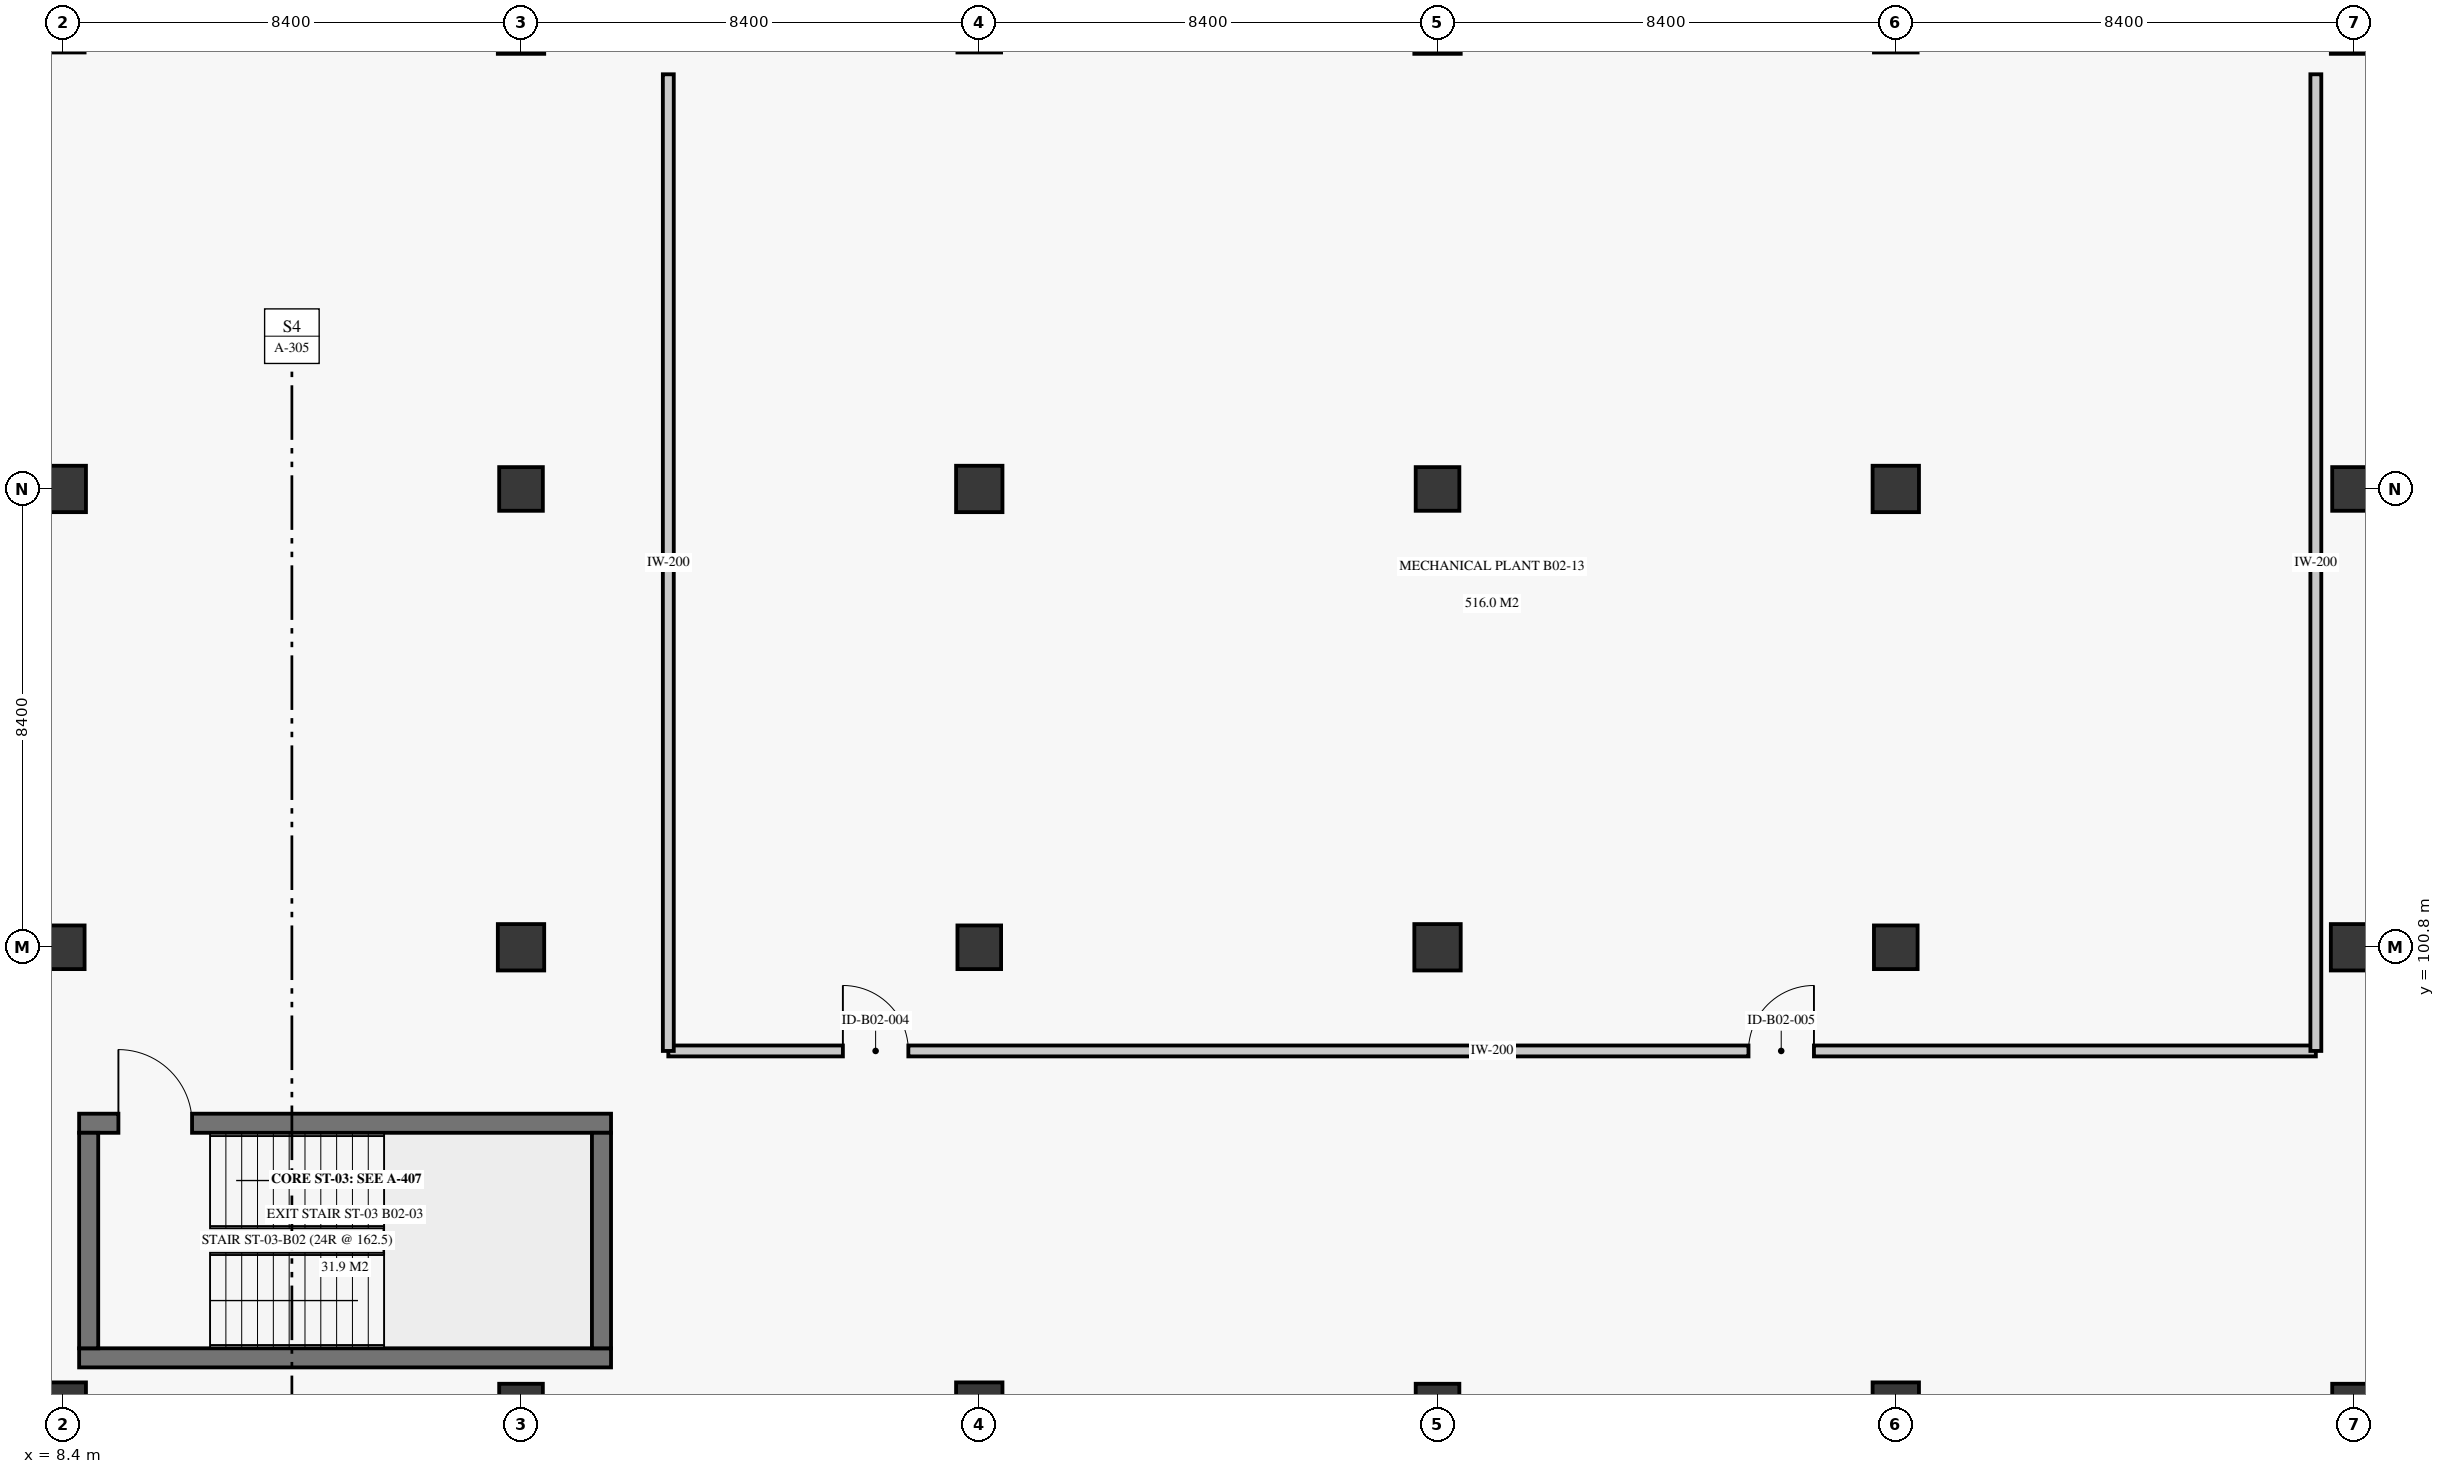
"""IFC4 building model, lengths in metres.
Left out: names, types, materials, properties, quantities, classifications, styles, units other than length and angle.
Written with IfcOpenShell. Run it as: python <this file> out.ifc"""

import sys

from ifc_helpers import new_model, si_unit, direction, frame, frame_2d, origin, origin_2d, place, context, subcontext, project, spatial, rectangle, extrude, element, fill, save


model = new_model("IFC4")
c1 = context("Model", 3, precision=1e-05, world=origin(), true_north=direction((0.0, 1.0)))
c2 = subcontext(c1, "Body", "Model", "MODEL_VIEW")
j1 = project(units=[si_unit("LENGTHUNIT", "METRE"), si_unit("PLANEANGLEUNIT", "RADIAN")], contexts=[c1])
p1 = place(None, origin())
s1 = spatial("IfcSite", under=j1, at=p1, CompositionType="ELEMENT")
p2 = place(p1, origin())
s2 = spatial("IfcBuilding", under=s1, at=p2, CompositionType="ELEMENT")
p3 = place(p2, frame((0.0, 0.0, -8.1)))
s3 = spatial("IfcBuildingStorey", under=s2, at=p3, CompositionType="ELEMENT", Elevation=-8.1)
p4 = place(p3, frame((8.4, 92.4, 0.0), z_axis=(0.0, 0.0, 1.0), x_axis=(1.0, 0.0, 0.0)))
e1 = element("IfcColumn", 1, at=p4, inside=s3, PredefinedType="COLUMN", context=c2, shape_type="SweptSolid", body=[
    extrude(rectangle(XDim=0.85, YDim=0.85, at=origin_2d()), origin(), (0.0, 0.0, 1.0), 3.6),
])
p5 = place(p3, frame((8.4, 100.8, 0.0), z_axis=(0.0, 0.0, 1.0), x_axis=(1.0, 0.0, 0.0)))
e2 = element("IfcColumn", 2, at=p5, inside=s3, PredefinedType="COLUMN", context=c2, shape_type="SweptSolid", body=[
    extrude(rectangle(XDim=0.8, YDim=0.8, at=origin_2d()), origin(), (0.0, 0.0, 1.0), 3.6),
])
p6 = place(p3, frame((8.4, 109.2, 0.0), z_axis=(0.0, 0.0, 1.0), x_axis=(1.0, 0.0, 0.0)))
e3 = element("IfcColumn", 3, at=p6, inside=s3, PredefinedType="COLUMN", context=c2, shape_type="SweptSolid", body=[
    extrude(rectangle(XDim=0.85, YDim=0.85, at=origin_2d()), origin(), (0.0, 0.0, 1.0), 3.6),
])
p7 = place(p3, frame((16.8, 92.4, 0.0), z_axis=(0.0, 0.0, 1.0), x_axis=(1.0, 0.0, 0.0)))
e4 = element("IfcColumn", 4, at=p7, inside=s3, PredefinedType="COLUMN", context=c2, shape_type="SweptSolid", body=[
    extrude(rectangle(XDim=0.8, YDim=0.8, at=origin_2d()), origin(), (0.0, 0.0, 1.0), 3.6),
])
p8 = place(p3, frame((16.8, 100.8, 0.0), z_axis=(0.0, 0.0, 1.0), x_axis=(1.0, 0.0, 0.0)))
e5 = element("IfcColumn", 5, at=p8, inside=s3, PredefinedType="COLUMN", context=c2, shape_type="SweptSolid", body=[
    extrude(rectangle(XDim=0.85, YDim=0.85, at=origin_2d()), origin(), (0.0, 0.0, 1.0), 3.6),
])
p9 = place(p3, frame((16.8, 109.2, 0.0), z_axis=(0.0, 0.0, 1.0), x_axis=(1.0, 0.0, 0.0)))
e6 = element("IfcColumn", 6, at=p9, inside=s3, PredefinedType="COLUMN", context=c2, shape_type="SweptSolid", body=[
    extrude(rectangle(XDim=0.8, YDim=0.8, at=origin_2d()), origin(), (0.0, 0.0, 1.0), 3.6),
])
for number, where, z_axis, x_axis in (
    (7, (16.8, 117.6, 0.0), (0.0, 0.0, 1.0), (1.0, 0.0, 0.0)),
    (8, (25.2, 92.4, 0.0), (0.0, 0.0, 1.0), (1.0, 0.0, 0.0)),
):
    element("IfcColumn", number, at=place(p3, frame(where, z_axis=z_axis, x_axis=x_axis)), inside=s3, PredefinedType="COLUMN", context=c2, shape_type="SweptSolid", body=[
        extrude(rectangle(XDim=0.85, YDim=0.85, at=origin_2d()), origin(), (0.0, 0.0, 1.0), 3.6),
    ])
p10 = place(p3, frame((25.2, 100.8, 0.0), z_axis=(0.0, 0.0, 1.0), x_axis=(1.0, 0.0, 0.0)))
e9 = element("IfcColumn", 9, at=p10, inside=s3, PredefinedType="COLUMN", context=c2, shape_type="SweptSolid", body=[
    extrude(rectangle(XDim=0.8, YDim=0.8, at=origin_2d()), origin(), (0.0, 0.0, 1.0), 3.6),
])
p11 = place(p3, frame((25.2, 109.2, 0.0), z_axis=(0.0, 0.0, 1.0), x_axis=(1.0, 0.0, 0.0)))
e10 = element("IfcColumn", 10, at=p11, inside=s3, PredefinedType="COLUMN", context=c2, shape_type="SweptSolid", body=[
    extrude(rectangle(XDim=0.85, YDim=0.85, at=origin_2d()), origin(), (0.0, 0.0, 1.0), 3.6),
])
p12 = place(p3, frame((33.6, 92.4, 0.0), z_axis=(0.0, 0.0, 1.0), x_axis=(1.0, 0.0, 0.0)))
e11 = element("IfcColumn", 11, at=p12, inside=s3, PredefinedType="COLUMN", context=c2, shape_type="SweptSolid", body=[
    extrude(rectangle(XDim=0.8, YDim=0.8, at=origin_2d()), origin(), (0.0, 0.0, 1.0), 3.6),
])
p13 = place(p3, frame((33.6, 100.8, 0.0), z_axis=(0.0, 0.0, 1.0), x_axis=(1.0, 0.0, 0.0)))
e12 = element("IfcColumn", 12, at=p13, inside=s3, PredefinedType="COLUMN", context=c2, shape_type="SweptSolid", body=[
    extrude(rectangle(XDim=0.85, YDim=0.85, at=origin_2d()), origin(), (0.0, 0.0, 1.0), 3.6),
])
p14 = place(p3, frame((33.6, 109.2, 0.0), z_axis=(0.0, 0.0, 1.0), x_axis=(1.0, 0.0, 0.0)))
e13 = element("IfcColumn", 13, at=p14, inside=s3, PredefinedType="COLUMN", context=c2, shape_type="SweptSolid", body=[
    extrude(rectangle(XDim=0.8, YDim=0.8, at=origin_2d()), origin(), (0.0, 0.0, 1.0), 3.6),
])
for number, where, z_axis, x_axis in (
    (14, (33.6, 117.6, 0.0), (0.0, 0.0, 1.0), (1.0, 0.0, 0.0)),
    (15, (42.0, 92.4, 0.0), (0.0, 0.0, 1.0), (1.0, 0.0, 0.0)),
):
    element("IfcColumn", number, at=place(p3, frame(where, z_axis=z_axis, x_axis=x_axis)), inside=s3, PredefinedType="COLUMN", context=c2, shape_type="SweptSolid", body=[
        extrude(rectangle(XDim=0.85, YDim=0.85, at=origin_2d()), origin(), (0.0, 0.0, 1.0), 3.6),
    ])
p15 = place(p3, frame((42.0, 100.8, 0.0), z_axis=(0.0, 0.0, 1.0), x_axis=(1.0, 0.0, 0.0)))
e16 = element("IfcColumn", 16, at=p15, inside=s3, PredefinedType="COLUMN", context=c2, shape_type="SweptSolid", body=[
    extrude(rectangle(XDim=0.8, YDim=0.8, at=origin_2d()), origin(), (0.0, 0.0, 1.0), 3.6),
])
p16 = place(p3, frame((42.0, 109.2, 0.0), z_axis=(0.0, 0.0, 1.0), x_axis=(1.0, 0.0, 0.0)))
e17 = element("IfcColumn", 17, at=p16, inside=s3, PredefinedType="COLUMN", context=c2, shape_type="SweptSolid", body=[
    extrude(rectangle(XDim=0.85, YDim=0.85, at=origin_2d()), origin(), (0.0, 0.0, 1.0), 3.6),
])
p17 = place(p3, frame((50.4, 92.4, 0.0), z_axis=(0.0, 0.0, 1.0), x_axis=(1.0, 0.0, 0.0)))
e18 = element("IfcColumn", 18, at=p17, inside=s3, PredefinedType="COLUMN", context=c2, shape_type="SweptSolid", body=[
    extrude(rectangle(XDim=0.8, YDim=0.8, at=origin_2d()), origin(), (0.0, 0.0, 1.0), 3.6),
])
p18 = place(p3, frame((50.4, 100.8, 0.0), z_axis=(0.0, 0.0, 1.0), x_axis=(1.0, 0.0, 0.0)))
e19 = element("IfcColumn", 19, at=p18, inside=s3, PredefinedType="COLUMN", context=c2, shape_type="SweptSolid", body=[
    extrude(rectangle(XDim=0.85, YDim=0.85, at=origin_2d()), origin(), (0.0, 0.0, 1.0), 3.6),
])
p19 = place(p3, frame((50.4, 109.2, 0.0), z_axis=(0.0, 0.0, 1.0), x_axis=(1.0, 0.0, 0.0)))
e20 = element("IfcColumn", 20, at=p19, inside=s3, PredefinedType="COLUMN", context=c2, shape_type="SweptSolid", body=[
    extrude(rectangle(XDim=0.8, YDim=0.8, at=origin_2d()), origin(), (0.0, 0.0, 1.0), 3.6),
])
p20 = place(p3, frame((50.4, 117.6, 0.0), z_axis=(0.0, 0.0, 1.0), x_axis=(1.0, 0.0, 0.0)))
e21 = element("IfcColumn", 21, at=p20, inside=s3, PredefinedType="COLUMN", context=c2, shape_type="SweptSolid", body=[
    extrude(rectangle(XDim=0.85, YDim=0.85, at=origin_2d()), origin(), (0.0, 0.0, 1.0), 3.6),
])
p21 = place(p3, frame((8.7, 93.275, 0.0), z_axis=(0.0, 0.0, 1.0), x_axis=(1.0, 0.0, 0.0)))
e22 = element("IfcWall", 22, at=p21, inside=s3, PredefinedType="SHEAR", context=c2, shape_type="SweptSolid", body=[
    extrude(rectangle(XDim=9.75, YDim=0.35, at=frame_2d((4.875, 0.0))), origin(), (0.0, 0.0, 1.0), 3.6),
])
p22 = place(p3, frame((8.7, 97.575, 0.0), z_axis=(0.0, 0.0, 1.0), x_axis=(1.0, 0.0, 0.0)))
e23 = element("IfcWall", 23, at=p22, inside=s3, PredefinedType="SHEAR", context=c2, shape_type="SweptSolid", body=[
    extrude(rectangle(XDim=9.75, YDim=0.35, at=frame_2d((4.875, 0.0))), origin(), (0.0, 0.0, 1.0), 3.6),
])
p23 = place(p22, frame((0.72, 0.0, 0.0)))
e24 = element("IfcOpeningElement", 24, at=p23, cuts=e23, PredefinedType="OPENING", context=c2, shape_type="SweptSolid", body=[
    extrude(rectangle(XDim=1.35, YDim=2.25, at=frame_2d((0.675, 1.125))), frame((0.0, 0.185, 0.0), z_axis=(0.0, -1.0, 0.0), x_axis=(1.0, 0.0, 0.0)), (0.0, 0.0, 1.0), 0.37),
])
for number, where, z_axis, x_axis in (
    (25, (8.875, 93.45, 0.0), (0.0, 0.0, 1.0), (0.0, 1.0, 0.0)),
    (26, (18.275, 93.45, 0.0), (0.0, 0.0, 1.0), (0.0, 1.0, 0.0)),
):
    element("IfcWall", number, at=place(p3, frame(where, z_axis=z_axis, x_axis=x_axis)), inside=s3, PredefinedType="SHEAR", context=c2, shape_type="SweptSolid", body=[
        extrude(rectangle(XDim=3.95, YDim=0.35, at=frame_2d((1.975, 0.0))), origin(), (0.0, 0.0, 1.0), 3.6),
    ])
p24 = place(p3, frame((19.5, 98.9, 0.0), z_axis=(0.0, 0.0, 1.0), x_axis=(1.0, 0.0, 0.0)))
e27 = element("IfcWall", 27, at=p24, inside=s3, PredefinedType="PARTITIONING", context=c2, shape_type="SweptSolid", body=[
    extrude(rectangle(XDim=30.2, YDim=0.2, at=frame_2d((15.1, 0.0))), origin(), (0.0, 0.0, 1.0), 3.22),
])
p25 = place(p24, frame((3.2, 0.0, 0.0)))
e28 = element("IfcOpeningElement", 28, at=p25, cuts=e27, PredefinedType="OPENING", context=c2, shape_type="SweptSolid", body=[
    extrude(rectangle(XDim=1.2, YDim=2.2, at=frame_2d((0.6, 1.1))), frame((0.0, 0.11, 0.0), z_axis=(0.0, -1.0, 0.0), x_axis=(1.0, 0.0, 0.0)), (0.0, 0.0, 1.0), 0.22),
])
p26 = place(p24, frame((19.8, 0.0, 0.0)))
e29 = element("IfcOpeningElement", 29, at=p26, cuts=e27, PredefinedType="OPENING", context=c2, shape_type="SweptSolid", body=[
    extrude(rectangle(XDim=1.2, YDim=2.2, at=frame_2d((0.6, 1.1))), frame((0.0, 0.11, 0.0), z_axis=(0.0, -1.0, 0.0), x_axis=(1.0, 0.0, 0.0)), (0.0, 0.0, 1.0), 0.22),
])
for number, where, z_axis, x_axis in (
    (30, (19.5, 98.9, 0.0), (0.0, 0.0, 1.0), (0.0, 1.0, 0.0)),
    (31, (49.7, 98.9, 0.0), (0.0, 0.0, 1.0), (0.0, 1.0, 0.0)),
):
    element("IfcWall", number, at=place(p3, frame(where, z_axis=z_axis, x_axis=x_axis)), inside=s3, PredefinedType="PARTITIONING", context=c2, shape_type="SweptSolid", body=[
        extrude(rectangle(XDim=17.9, YDim=0.2, at=frame_2d((8.95, 0.0))), origin(), (0.0, 0.0, 1.0), 3.22),
    ])
p27 = place(p23, origin())
e32 = element("IfcDoor", 32, at=p27, inside=s3, OperationType="SINGLE_SWING_LEFT", PredefinedType="DOOR", context=c2, shape_type="SweptSolid", body=[
    extrude(rectangle(XDim=1.35, YDim=2.25, at=frame_2d((0.675, 1.125))), frame((0.0, 0.025, 0.0), z_axis=(0.0, -1.0, 0.0), x_axis=(1.0, 0.0, 0.0)), (0.0, 0.0, 1.0), 0.05),
])
fill(e24, e32)
p28 = place(p25, origin())
e33 = element("IfcDoor", 33, at=p28, inside=s3, OperationType="SINGLE_SWING_LEFT", PredefinedType="DOOR", context=c2, shape_type="SweptSolid", body=[
    extrude(rectangle(XDim=1.2, YDim=2.2, at=frame_2d((0.6, 1.1))), frame((0.0, 0.025, 0.0), z_axis=(0.0, -1.0, 0.0), x_axis=(1.0, 0.0, 0.0)), (0.0, 0.0, 1.0), 0.05),
])
fill(e28, e33)
p29 = place(p26, origin())
e34 = element("IfcDoor", 34, at=p29, inside=s3, OperationType="SINGLE_SWING_RIGHT", PredefinedType="DOOR", context=c2, shape_type="SweptSolid", body=[
    extrude(rectangle(XDim=1.2, YDim=2.2, at=frame_2d((0.6, 1.1))), frame((0.0, 0.025, 0.0), z_axis=(0.0, -1.0, 0.0), x_axis=(1.0, 0.0, 0.0)), (0.0, 0.0, 1.0), 0.05),
])
fill(e29, e34)
save(model, sys.argv[1])
